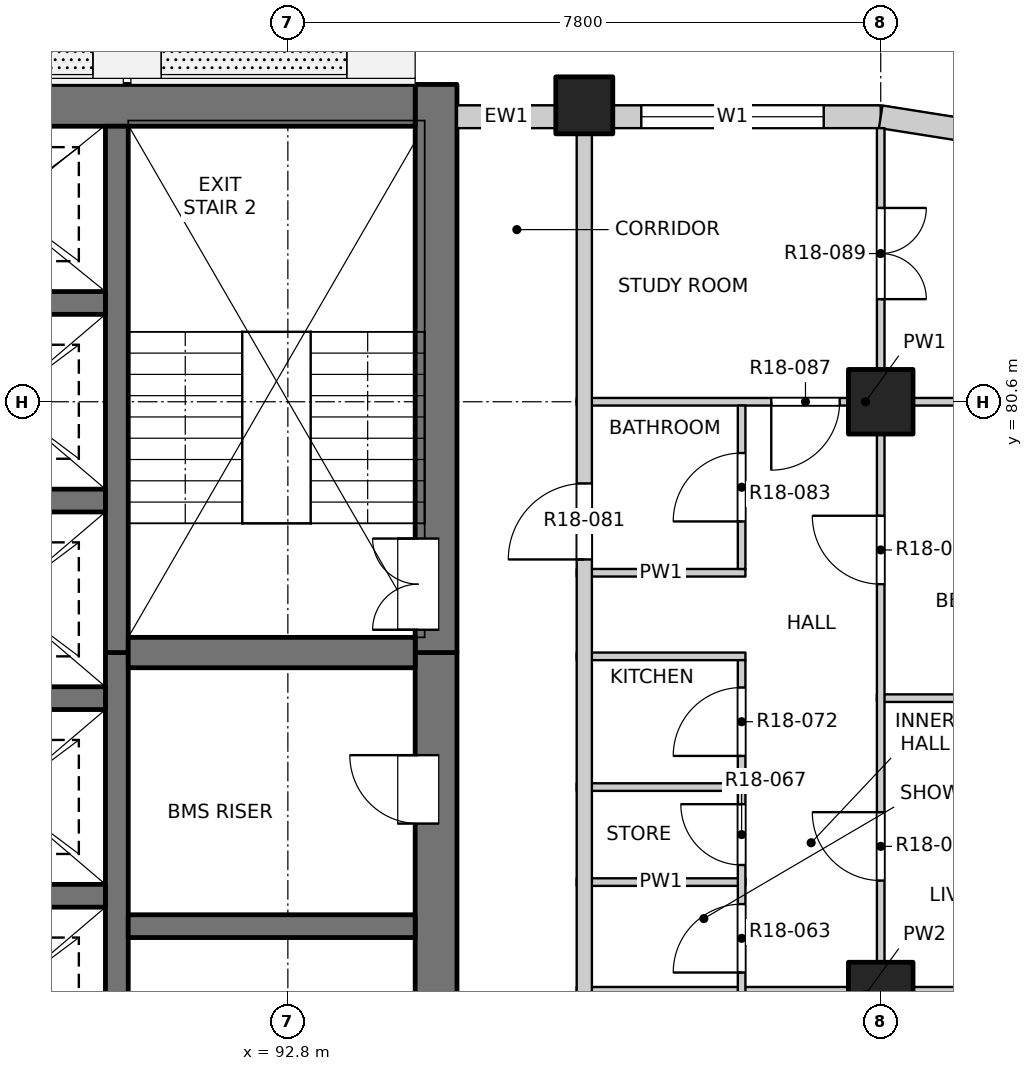
"""IFC4 building model, lengths in metres.
Left out: names, types, materials, properties, quantities, classifications, styles, units other than length and angle.
Written with IfcOpenShell. Run it as: python <this file> out.ifc"""

import sys

from ifc_helpers import new_model, si_unit, direction, frame, frame_2d, origin, origin_2d, place, context, subcontext, project, spatial, rectangle, extrude, element, fill, save


model = new_model("IFC4")
c1 = context("Model", 3, precision=1e-05, world=origin(), true_north=direction((0.0, 1.0)))
c2 = subcontext(c1, "Body", "Model", "MODEL_VIEW")
j1 = project(units=[si_unit("LENGTHUNIT", "METRE"), si_unit("PLANEANGLEUNIT", "RADIAN")], contexts=[c1])
p1 = place(None, origin())
s1 = spatial("IfcSite", under=j1, at=p1, CompositionType="ELEMENT")
p2 = place(p1, origin())
s2 = spatial("IfcBuilding", under=s1, at=p2, CompositionType="ELEMENT")
p3 = place(p2, frame((0.0, 0.0, 189.4)))
s3 = spatial("IfcBuildingStorey", under=s2, at=p3, CompositionType="ELEMENT", Elevation=189.4)
p4 = place(p3, frame((96.7, 84.5, -0.25), z_axis=(0.0, 0.0, 1.0), x_axis=(1.0, 0.0, 0.0)))
e1 = element("IfcColumn", 1, at=p4, inside=s3, PredefinedType="COLUMN", context=c2, shape_type="SweptSolid", body=[
    extrude(rectangle(XDim=0.75, YDim=0.75, at=origin_2d()), origin(), (0.0, 0.0, 1.0), 3.35),
])
for number, where, z_axis, x_axis in (
    (2, (100.6, 72.8, -0.25), (0.0, 0.0, 1.0), (1.0, 0.0, 0.0)),
    (3, (100.6, 80.6, -0.25), (0.0, 0.0, 1.0), (1.0, 0.0, 0.0)),
):
    element("IfcColumn", number, at=place(p3, frame(where, z_axis=z_axis, x_axis=x_axis)), inside=s3, PredefinedType="COLUMN", context=c2, shape_type="SweptSolid", body=[
        extrude(rectangle(XDim=0.85, YDim=0.85, at=origin_2d()), origin(), (0.0, 0.0, 1.0), 3.35),
    ])
p5 = place(p3, frame((94.75, 61.95, -0.25), z_axis=(0.0, 0.0, 1.0), x_axis=(0.0, 1.0, 0.0)))
e4 = element("IfcWall", 4, at=p5, inside=s3, PredefinedType="SOLIDWALL", context=c2, shape_type="SweptSolid", body=[
    extrude(rectangle(XDim=15.35, YDim=0.55, at=frame_2d((7.675, 0.0))), origin(), (0.0, 0.0, 1.0), 3.35),
])
p6 = place(p5, frame((0.925, 0.0, 0.25)))
e5 = element("IfcOpeningElement", 5, at=p6, cuts=e4, PredefinedType="OPENING", context=c2, shape_type="SweptSolid", body=[
    extrude(rectangle(XDim=0.9, YDim=2.1, at=frame_2d((0.45, 1.05))), frame((0.0, 0.285, 0.0), z_axis=(0.0, -1.0, 0.0), x_axis=(1.0, 0.0, 0.0)), (0.0, 0.0, 1.0), 0.57),
])
p7 = place(p5, frame((6.8, 0.0, 0.25)))
e6 = element("IfcOpeningElement", 6, at=p7, cuts=e4, PredefinedType="OPENING", context=c2, shape_type="SweptSolid", body=[
    extrude(rectangle(XDim=0.9, YDim=2.1, at=frame_2d((0.45, 1.05))), frame((0.0, 0.285, 0.0), z_axis=(0.0, -1.0, 0.0), x_axis=(1.0, 0.0, 0.0)), (0.0, 0.0, 1.0), 0.57),
])
p8 = place(p5, frame((13.1, 0.0, 0.25)))
e7 = element("IfcOpeningElement", 7, at=p8, cuts=e4, PredefinedType="OPENING", context=c2, shape_type="SweptSolid", body=[
    extrude(rectangle(XDim=0.9, YDim=2.1, at=frame_2d((0.45, 1.05))), frame((0.0, 0.285, 0.0), z_axis=(0.0, -1.0, 0.0), x_axis=(1.0, 0.0, 0.0)), (0.0, 0.0, 1.0), 0.57),
])
p9 = place(p3, frame((94.75, 77.3, -0.25), z_axis=(0.0, 0.0, 1.0), x_axis=(0.0, 1.0, 0.0)))
e8 = element("IfcWall", 8, at=p9, inside=s3, PredefinedType="SOLIDWALL", context=c2, shape_type="SweptSolid", body=[
    extrude(rectangle(XDim=7.475, YDim=0.55, at=frame_2d((3.737, 0.0))), origin(), (0.0, 0.0, 1.0), 3.35),
])
p10 = place(p9, frame((0.3, 0.0, 0.25)))
e9 = element("IfcOpeningElement", 9, at=p10, cuts=e8, PredefinedType="OPENING", context=c2, shape_type="SweptSolid", body=[
    extrude(rectangle(XDim=1.2, YDim=2.1, at=frame_2d((0.6, 1.05))), frame((0.0, 0.285, 0.0), z_axis=(0.0, -1.0, 0.0), x_axis=(1.0, 0.0, 0.0)), (0.0, 0.0, 1.0), 0.57),
])
p11 = place(p3, frame((75.525, 84.5, -0.25), z_axis=(0.0, 0.0, 1.0), x_axis=(1.0, 0.0, 0.0)))
e10 = element("IfcWall", 10, at=p11, inside=s3, PredefinedType="SOLIDWALL", context=c2, shape_type="SweptSolid", body=[
    extrude(rectangle(XDim=18.95, YDim=0.55, at=frame_2d((9.475, 0.0))), origin(), (0.0, 0.0, 1.0), 3.35),
])
p12 = place(p3, frame((90.55, 61.95, -0.25), z_axis=(0.0, 0.0, 1.0), x_axis=(0.0, 1.0, 0.0)))
e11 = element("IfcWall", 11, at=p12, inside=s3, PredefinedType="SOLIDWALL", context=c2, shape_type="SweptSolid", body=[
    extrude(rectangle(XDim=15.35, YDim=0.3, at=frame_2d((7.675, 0.0))), origin(), (0.0, 0.0, 1.0), 3.35),
])
p13 = place(p3, frame((90.55, 77.3, -0.25), z_axis=(0.0, 0.0, 1.0), x_axis=(0.0, 1.0, 0.0)))
e12 = element("IfcWall", 12, at=p13, inside=s3, PredefinedType="SOLIDWALL", context=c2, shape_type="SweptSolid", body=[
    extrude(rectangle(XDim=6.925, YDim=0.3, at=frame_2d((3.462, 0.0))), origin(), (0.0, 0.0, 1.0), 3.35),
])
for number, where, z_axis, x_axis in (
    (13, (87.4, 74.1, -0.25), (0.0, 0.0, 1.0), (1.0, 0.0, 0.0)),
    (14, (87.4, 76.7, -0.25), (0.0, 0.0, 1.0), (1.0, 0.0, 0.0)),
    (15, (87.4, 79.3, -0.25), (0.0, 0.0, 1.0), (1.0, 0.0, 0.0)),
    (16, (87.4, 81.9, -0.25), (0.0, 0.0, 1.0), (1.0, 0.0, 0.0)),
):
    element("IfcWall", number, at=place(p3, frame(where, z_axis=z_axis, x_axis=x_axis)), inside=s3, PredefinedType="SOLIDWALL", context=c2, shape_type="SweptSolid", body=[
        extrude(rectangle(XDim=3.0, YDim=0.3, at=frame_2d((1.5, 0.0))), origin(), (0.0, 0.0, 1.0), 3.35),
    ])
p14 = place(p3, frame((90.7, 73.7, -0.25), z_axis=(0.0, 0.0, 1.0), x_axis=(1.0, 0.0, 0.0)))
e17 = element("IfcWall", 17, at=p14, inside=s3, PredefinedType="SOLIDWALL", context=c2, shape_type="SweptSolid", body=[
    extrude(rectangle(XDim=3.775, YDim=0.3, at=frame_2d((1.888, 0.0))), origin(), (0.0, 0.0, 1.0), 3.35),
])
p15 = place(p3, frame((90.7, 77.3, -0.25), z_axis=(0.0, 0.0, 1.0), x_axis=(1.0, 0.0, 0.0)))
e18 = element("IfcWall", 18, at=p15, inside=s3, PredefinedType="SOLIDWALL", context=c2, shape_type="SweptSolid", body=[
    extrude(rectangle(XDim=3.775, YDim=0.4, at=frame_2d((1.888, 0.0))), origin(), (0.0, 0.0, 1.0), 3.35),
])
p16 = place(p3, frame((95.025, 84.35, 0.0), z_axis=(0.0, 0.0, 1.0), x_axis=(1.0, 0.0, 0.0)))
e19 = element("IfcWall", 19, at=p16, inside=s3, PredefinedType="SOLIDWALL", context=c2, shape_type="SweptSolid", body=[
    extrude(rectangle(XDim=1.3, YDim=0.3, at=frame_2d((0.65, 0.0))), origin(), (0.0, 0.0, 1.0), 3.1),
])
p17 = place(p3, frame((97.075, 84.35, 0.0), z_axis=(0.0, 0.0, 1.0), x_axis=(1.0, 0.0, 0.0)))
e20 = element("IfcWall", 20, at=p17, inside=s3, PredefinedType="SOLIDWALL", context=c2, shape_type="SweptSolid", body=[
    extrude(rectangle(XDim=3.525, YDim=0.3, at=frame_2d((1.763, 0.0))), origin(), (0.0, 0.0, 1.0), 3.1),
])
p18 = place(p17, frame((0.375, 0.0, 0.9)))
e21 = element("IfcOpeningElement", 21, at=p18, cuts=e20, PredefinedType="OPENING", context=c2, shape_type="SweptSolid", body=[
    extrude(rectangle(XDim=2.4, YDim=1.8, at=frame_2d((1.2, 0.9))), frame((0.0, 0.16, 0.0), z_axis=(0.0, -1.0, 0.0), x_axis=(1.0, 0.0, 0.0)), (0.0, 0.0, 1.0), 0.32),
])
p19 = place(p3, frame((101.759, 84.167, 0.0), z_axis=(0.0, 0.0, 1.0), x_axis=(-0.987678452879, 0.156496880861, 0.0)))
e22 = element("IfcWall", 22, at=p19, inside=s3, PredefinedType="SOLIDWALL", context=c2, shape_type="SweptSolid", body=[
    extrude(rectangle(XDim=1.173, YDim=0.3, at=frame_2d((0.586, 0.0))), origin(), (0.0, 0.0, 1.0), 3.1),
])
p20 = place(p3, frame((96.6, 72.8, 0.0), z_axis=(0.0, 0.0, 1.0), x_axis=(1.0, 0.0, 0.0)))
e23 = element("IfcWall", 23, at=p20, inside=s3, PredefinedType="PARTITIONING", context=c2, shape_type="SweptSolid", body=[
    extrude(rectangle(XDim=7.6, YDim=0.2, at=frame_2d((3.8, 0.0))), origin(), (0.0, 0.0, 1.0), 3.1),
])
for number, where, z_axis, x_axis in (
    (24, (96.6, 74.28, 0.0), (0.0, 0.0, 1.0), (1.0, 0.0, 0.0)),
    (25, (96.6, 75.53, 0.0), (0.0, 0.0, 1.0), (1.0, 0.0, 0.0)),
):
    element("IfcWall", number, at=place(p3, frame(where, z_axis=z_axis, x_axis=x_axis)), inside=s3, PredefinedType="PARTITIONING", context=c2, shape_type="SweptSolid", body=[
        extrude(rectangle(XDim=2.22, YDim=0.1, at=frame_2d((1.11, 0.0))), origin(), (0.0, 0.0, 1.0), 3.1),
    ])
p21 = place(p3, frame((100.55, 76.7, 0.0), z_axis=(0.0, 0.0, 1.0), x_axis=(1.0, 0.0, 0.0)))
e26 = element("IfcWall", 26, at=p21, inside=s3, PredefinedType="PARTITIONING", context=c2, shape_type="SweptSolid", body=[
    extrude(rectangle(XDim=3.65, YDim=0.1, at=frame_2d((1.825, 0.0))), origin(), (0.0, 0.0, 1.0), 3.1),
])
for number, where, z_axis, x_axis in (
    (27, (96.6, 77.25, 0.0), (0.0, 0.0, 1.0), (1.0, 0.0, 0.0)),
    (28, (96.6, 78.35, 0.0), (0.0, 0.0, 1.0), (1.0, 0.0, 0.0)),
):
    element("IfcWall", number, at=place(p3, frame(where, z_axis=z_axis, x_axis=x_axis)), inside=s3, PredefinedType="PARTITIONING", context=c2, shape_type="SweptSolid", body=[
        extrude(rectangle(XDim=2.22, YDim=0.1, at=frame_2d((1.11, 0.0))), origin(), (0.0, 0.0, 1.0), 3.1),
    ])
p22 = place(p3, frame((96.6, 80.6, 0.0), z_axis=(0.0, 0.0, 1.0), x_axis=(1.0, 0.0, 0.0)))
e29 = element("IfcWall", 29, at=p22, inside=s3, PredefinedType="PARTITIONING", context=c2, shape_type="SweptSolid", body=[
    extrude(rectangle(XDim=7.6, YDim=0.1, at=frame_2d((3.8, 0.0))), origin(), (0.0, 0.0, 1.0), 3.1),
])
p23 = place(p22, frame((2.56, 0.0, 0.0)))
e30 = element("IfcOpeningElement", 30, at=p23, cuts=e29, PredefinedType="OPENING", context=c2, shape_type="SweptSolid", body=[
    extrude(rectangle(XDim=0.9, YDim=2.1, at=frame_2d((0.45, 1.05))), frame((0.0, 0.06, 0.0), z_axis=(0.0, -1.0, 0.0), x_axis=(1.0, 0.0, 0.0)), (0.0, 0.0, 1.0), 0.12),
])
p24 = place(p3, frame((96.7, 49.5, 0.0), z_axis=(0.0, 0.0, 1.0), x_axis=(0.0, 1.0, 0.0)))
e31 = element("IfcWall", 31, at=p24, inside=s3, PredefinedType="PARTITIONING", context=c2, shape_type="SweptSolid", body=[
    extrude(rectangle(XDim=34.7, YDim=0.2, at=frame_2d((17.35, 0.0))), origin(), (0.0, 0.0, 1.0), 3.1),
])
p25 = place(p24, frame((7.425, 0.0, 0.0)))
e32 = element("IfcOpeningElement", 32, at=p25, cuts=e31, PredefinedType="OPENING", context=c2, shape_type="SweptSolid", body=[
    extrude(rectangle(XDim=1.0, YDim=2.1, at=frame_2d((0.5, 1.05))), frame((0.0, 0.11, 0.0), z_axis=(0.0, -1.0, 0.0), x_axis=(1.0, 0.0, 0.0)), (0.0, 0.0, 1.0), 0.22),
])
p26 = place(p24, frame((18.475, 0.0, 0.0)))
e33 = element("IfcOpeningElement", 33, at=p26, cuts=e31, PredefinedType="OPENING", context=c2, shape_type="SweptSolid", body=[
    extrude(rectangle(XDim=1.0, YDim=2.1, at=frame_2d((0.5, 1.05))), frame((0.0, 0.11, 0.0), z_axis=(0.0, -1.0, 0.0), x_axis=(1.0, 0.0, 0.0)), (0.0, 0.0, 1.0), 0.22),
])
p27 = place(p24, frame((29.025, 0.0, 0.0)))
e34 = element("IfcOpeningElement", 34, at=p27, cuts=e31, PredefinedType="OPENING", context=c2, shape_type="SweptSolid", body=[
    extrude(rectangle(XDim=1.0, YDim=2.1, at=frame_2d((0.5, 1.05))), frame((0.0, 0.11, 0.0), z_axis=(0.0, -1.0, 0.0), x_axis=(1.0, 0.0, 0.0)), (0.0, 0.0, 1.0), 0.22),
])
p28 = place(p3, frame((98.77, 67.85, 0.0), z_axis=(0.0, 0.0, 1.0), x_axis=(0.0, 1.0, 0.0)))
e35 = element("IfcWall", 35, at=p28, inside=s3, PredefinedType="PARTITIONING", context=c2, shape_type="SweptSolid", body=[
    extrude(rectangle(XDim=9.35, YDim=0.1, at=frame_2d((4.675, 0.0))), origin(), (0.0, 0.0, 1.0), 3.1),
])
p29 = place(p28, frame((0.55, 0.0, 0.0)))
e36 = element("IfcOpeningElement", 36, at=p29, cuts=e35, PredefinedType="OPENING", context=c2, shape_type="SweptSolid", body=[
    extrude(rectangle(XDim=0.9, YDim=2.1, at=frame_2d((0.45, 1.05))), frame((0.0, 0.06, 0.0), z_axis=(0.0, -1.0, 0.0), x_axis=(1.0, 0.0, 0.0)), (0.0, 0.0, 1.0), 0.12),
])
p30 = place(p28, frame((3.05, 0.0, 0.0)))
e37 = element("IfcOpeningElement", 37, at=p30, cuts=e35, PredefinedType="OPENING", context=c2, shape_type="SweptSolid", body=[
    extrude(rectangle(XDim=0.9, YDim=2.1, at=frame_2d((0.45, 1.05))), frame((0.0, 0.06, 0.0), z_axis=(0.0, -1.0, 0.0), x_axis=(1.0, 0.0, 0.0)), (0.0, 0.0, 1.0), 0.12),
])
p31 = place(p28, frame((5.24, 0.0, 0.0)))
e38 = element("IfcOpeningElement", 38, at=p31, cuts=e35, PredefinedType="OPENING", context=c2, shape_type="SweptSolid", body=[
    extrude(rectangle(XDim=0.9, YDim=2.1, at=frame_2d((0.45, 1.05))), frame((0.0, 0.06, 0.0), z_axis=(0.0, -1.0, 0.0), x_axis=(1.0, 0.0, 0.0)), (0.0, 0.0, 1.0), 0.12),
])
p32 = place(p28, frame((6.655, 0.0, 0.0)))
e39 = element("IfcOpeningElement", 39, at=p32, cuts=e35, PredefinedType="OPENING", context=c2, shape_type="SweptSolid", body=[
    extrude(rectangle(XDim=0.8, YDim=2.1, at=frame_2d((0.4, 1.05))), frame((0.0, 0.06, 0.0), z_axis=(0.0, -1.0, 0.0), x_axis=(1.0, 0.0, 0.0)), (0.0, 0.0, 1.0), 0.12),
])
p33 = place(p28, frame((8.09, 0.0, 0.0)))
e40 = element("IfcOpeningElement", 40, at=p33, cuts=e35, PredefinedType="OPENING", context=c2, shape_type="SweptSolid", body=[
    extrude(rectangle(XDim=0.9, YDim=2.1, at=frame_2d((0.45, 1.05))), frame((0.0, 0.06, 0.0), z_axis=(0.0, -1.0, 0.0), x_axis=(1.0, 0.0, 0.0)), (0.0, 0.0, 1.0), 0.12),
])
p34 = place(p3, frame((98.77, 78.4, 0.0), z_axis=(0.0, 0.0, 1.0), x_axis=(0.0, 1.0, 0.0)))
e41 = element("IfcWall", 41, at=p34, inside=s3, PredefinedType="PARTITIONING", context=c2, shape_type="SweptSolid", body=[
    extrude(rectangle(XDim=2.15, YDim=0.1, at=frame_2d((1.075, 0.0))), origin(), (0.0, 0.0, 1.0), 3.1),
])
p35 = place(p34, frame((0.625, 0.0, 0.0)))
e42 = element("IfcOpeningElement", 42, at=p35, cuts=e41, PredefinedType="OPENING", context=c2, shape_type="SweptSolid", body=[
    extrude(rectangle(XDim=0.9, YDim=2.1, at=frame_2d((0.45, 1.05))), frame((0.0, 0.06, 0.0), z_axis=(0.0, -1.0, 0.0), x_axis=(1.0, 0.0, 0.0)), (0.0, 0.0, 1.0), 0.12),
])
p36 = place(p3, frame((100.6, 45.8, 0.0), z_axis=(0.0, 0.0, 1.0), x_axis=(0.0, 1.0, 0.0)))
e43 = element("IfcWall", 43, at=p36, inside=s3, PredefinedType="PARTITIONING", context=c2, shape_type="SweptSolid", body=[
    extrude(rectangle(XDim=38.4, YDim=0.1, at=frame_2d((19.2, 0.0))), origin(), (0.0, 0.0, 1.0), 3.1),
])
p37 = place(p36, frame((1.05, 0.0, 0.0)))
e44 = element("IfcOpeningElement", 44, at=p37, cuts=e43, PredefinedType="OPENING", context=c2, shape_type="SweptSolid", body=[
    extrude(rectangle(XDim=1.2, YDim=2.1, at=frame_2d((0.6, 1.05))), frame((0.0, 0.06, 0.0), z_axis=(0.0, -1.0, 0.0), x_axis=(1.0, 0.0, 0.0)), (0.0, 0.0, 1.0), 0.12),
])
p38 = place(p36, frame((5.1, 0.0, 0.0)))
e45 = element("IfcOpeningElement", 45, at=p38, cuts=e43, PredefinedType="OPENING", context=c2, shape_type="SweptSolid", body=[
    extrude(rectangle(XDim=0.9, YDim=2.1, at=frame_2d((0.45, 1.05))), frame((0.0, 0.06, 0.0), z_axis=(0.0, -1.0, 0.0), x_axis=(1.0, 0.0, 0.0)), (0.0, 0.0, 1.0), 0.12),
])
p39 = place(p36, frame((9.0, 0.0, 0.0)))
e46 = element("IfcOpeningElement", 46, at=p39, cuts=e43, PredefinedType="OPENING", context=c2, shape_type="SweptSolid", body=[
    extrude(rectangle(XDim=0.9, YDim=2.1, at=frame_2d((0.45, 1.05))), frame((0.0, 0.06, 0.0), z_axis=(0.0, -1.0, 0.0), x_axis=(1.0, 0.0, 0.0)), (0.0, 0.0, 1.0), 0.12),
])
p40 = place(p36, frame((12.9, 0.0, 0.0)))
e47 = element("IfcOpeningElement", 47, at=p40, cuts=e43, PredefinedType="OPENING", context=c2, shape_type="SweptSolid", body=[
    extrude(rectangle(XDim=0.9, YDim=2.1, at=frame_2d((0.45, 1.05))), frame((0.0, 0.06, 0.0), z_axis=(0.0, -1.0, 0.0), x_axis=(1.0, 0.0, 0.0)), (0.0, 0.0, 1.0), 0.12),
])
p41 = place(p36, frame((19.725, 0.0, 0.0)))
e48 = element("IfcOpeningElement", 48, at=p41, cuts=e43, PredefinedType="OPENING", context=c2, shape_type="SweptSolid", body=[
    extrude(rectangle(XDim=1.2, YDim=2.1, at=frame_2d((0.6, 1.05))), frame((0.0, 0.06, 0.0), z_axis=(0.0, -1.0, 0.0), x_axis=(1.0, 0.0, 0.0)), (0.0, 0.0, 1.0), 0.12),
])
p42 = place(p36, frame((24.6, 0.0, 0.0)))
e49 = element("IfcOpeningElement", 49, at=p42, cuts=e43, PredefinedType="OPENING", context=c2, shape_type="SweptSolid", body=[
    extrude(rectangle(XDim=0.9, YDim=2.1, at=frame_2d((0.45, 1.05))), frame((0.0, 0.06, 0.0), z_axis=(0.0, -1.0, 0.0), x_axis=(1.0, 0.0, 0.0)), (0.0, 0.0, 1.0), 0.12),
])
p43 = place(p36, frame((28.5, 0.0, 0.0)))
e50 = element("IfcOpeningElement", 50, at=p43, cuts=e43, PredefinedType="OPENING", context=c2, shape_type="SweptSolid", body=[
    extrude(rectangle(XDim=0.9, YDim=2.1, at=frame_2d((0.45, 1.05))), frame((0.0, 0.06, 0.0), z_axis=(0.0, -1.0, 0.0), x_axis=(1.0, 0.0, 0.0)), (0.0, 0.0, 1.0), 0.12),
])
p44 = place(p36, frame((32.4, 0.0, 0.0)))
e51 = element("IfcOpeningElement", 51, at=p44, cuts=e43, PredefinedType="OPENING", context=c2, shape_type="SweptSolid", body=[
    extrude(rectangle(XDim=0.9, YDim=2.1, at=frame_2d((0.45, 1.05))), frame((0.0, 0.06, 0.0), z_axis=(0.0, -1.0, 0.0), x_axis=(1.0, 0.0, 0.0)), (0.0, 0.0, 1.0), 0.12),
])
p45 = place(p36, frame((36.15, 0.0, 0.0)))
e52 = element("IfcOpeningElement", 52, at=p45, cuts=e43, PredefinedType="OPENING", context=c2, shape_type="SweptSolid", body=[
    extrude(rectangle(XDim=1.2, YDim=2.1, at=frame_2d((0.6, 1.05))), frame((0.0, 0.06, 0.0), z_axis=(0.0, -1.0, 0.0), x_axis=(1.0, 0.0, 0.0)), (0.0, 0.0, 1.0), 0.12),
])
p46 = place(p18, origin())
e53 = element("IfcWindow", 53, at=p46, inside=s3, PartitioningType="DOUBLE_PANEL_VERTICAL", PredefinedType="WINDOW", context=c2, shape_type="SweptSolid", body=[
    extrude(rectangle(XDim=2.4, YDim=1.8, at=frame_2d((1.2, 0.9))), frame((0.0, 0.03, 0.0), z_axis=(0.0, -1.0, 0.0), x_axis=(1.0, 0.0, 0.0)), (0.0, 0.0, 1.0), 0.06),
])
fill(e21, e53)
p47 = place(p31, origin())
e54 = element("IfcDoor", 54, at=p47, inside=s3, OperationType="SINGLE_SWING_LEFT", PredefinedType="DOOR", context=c2, shape_type="SweptSolid", body=[
    extrude(rectangle(XDim=0.9, YDim=2.1, at=frame_2d((0.45, 1.05))), frame((0.0, 0.025, 0.0), z_axis=(0.0, -1.0, 0.0), x_axis=(1.0, 0.0, 0.0)), (0.0, 0.0, 1.0), 0.05),
])
fill(e38, e54)
p48 = place(p43, origin())
e55 = element("IfcDoor", 55, at=p48, inside=s3, OperationType="SINGLE_SWING_RIGHT", PredefinedType="DOOR", context=c2, shape_type="SweptSolid", body=[
    extrude(rectangle(XDim=0.9, YDim=2.1, at=frame_2d((0.45, 1.05))), frame((0.0, 0.025, 0.0), z_axis=(0.0, -1.0, 0.0), x_axis=(1.0, 0.0, 0.0)), (0.0, 0.0, 1.0), 0.05),
])
fill(e50, e55)
p49 = place(p32, origin())
e56 = element("IfcDoor", 56, at=p49, inside=s3, OperationType="SINGLE_SWING_RIGHT", PredefinedType="DOOR", context=c2, shape_type="SweptSolid", body=[
    extrude(rectangle(XDim=0.8, YDim=2.1, at=frame_2d((0.4, 1.05))), frame((0.0, 0.025, 0.0), z_axis=(0.0, -1.0, 0.0), x_axis=(1.0, 0.0, 0.0)), (0.0, 0.0, 1.0), 0.05),
])
fill(e39, e56)
p50 = place(p8, origin())
e57 = element("IfcDoor", 57, at=p50, inside=s3, OperationType="SINGLE_SWING_RIGHT", PredefinedType="DOOR", context=c2, shape_type="SweptSolid", body=[
    extrude(rectangle(XDim=0.9, YDim=2.1, at=frame_2d((0.45, 1.05))), frame((0.0, 0.26, 0.0), z_axis=(0.0, -1.0, 0.0), x_axis=(1.0, 0.0, 0.0)), (0.0, 0.0, 1.0), 0.05),
])
fill(e7, e57)
p51 = place(p33, origin())
e58 = element("IfcDoor", 58, at=p51, inside=s3, OperationType="SINGLE_SWING_LEFT", PredefinedType="DOOR", context=c2, shape_type="SweptSolid", body=[
    extrude(rectangle(XDim=0.9, YDim=2.1, at=frame_2d((0.45, 1.05))), frame((0.0, 0.025, 0.0), z_axis=(0.0, -1.0, 0.0), x_axis=(1.0, 0.0, 0.0)), (0.0, 0.0, 1.0), 0.05),
])
fill(e40, e58)
p52 = place(p10, origin())
e59 = element("IfcDoor", 59, at=p52, inside=s3, OperationType="DOUBLE_DOOR_SINGLE_SWING", PredefinedType="DOOR", context=c2, shape_type="SweptSolid", body=[
    extrude(rectangle(XDim=1.2, YDim=2.1, at=frame_2d((0.6, 1.05))), frame((0.0, 0.26, 0.0), z_axis=(0.0, -1.0, 0.0), x_axis=(1.0, 0.0, 0.0)), (0.0, 0.0, 1.0), 0.05),
])
fill(e9, e59)
p53 = place(p44, origin())
e60 = element("IfcDoor", 60, at=p53, inside=s3, OperationType="SINGLE_SWING_RIGHT", PredefinedType="DOOR", context=c2, shape_type="SweptSolid", body=[
    extrude(rectangle(XDim=0.9, YDim=2.1, at=frame_2d((0.45, 1.05))), frame((0.0, 0.025, 0.0), z_axis=(0.0, -1.0, 0.0), x_axis=(1.0, 0.0, 0.0)), (0.0, 0.0, 1.0), 0.05),
])
fill(e51, e60)
p54 = place(p27, origin())
e61 = element("IfcDoor", 61, at=p54, inside=s3, OperationType="SINGLE_SWING_LEFT", PredefinedType="DOOR", context=c2, shape_type="SweptSolid", body=[
    extrude(rectangle(XDim=1.0, YDim=2.1, at=frame_2d((0.5, 1.05))), frame((0.0, 0.025, 0.0), z_axis=(0.0, -1.0, 0.0), x_axis=(1.0, 0.0, 0.0)), (0.0, 0.0, 1.0), 0.05),
])
fill(e34, e61)
p55 = place(p35, origin())
e62 = element("IfcDoor", 62, at=p55, inside=s3, OperationType="SINGLE_SWING_LEFT", PredefinedType="DOOR", context=c2, shape_type="SweptSolid", body=[
    extrude(rectangle(XDim=0.9, YDim=2.1, at=frame_2d((0.45, 1.05))), frame((0.0, 0.025, 0.0), z_axis=(0.0, -1.0, 0.0), x_axis=(1.0, 0.0, 0.0)), (0.0, 0.0, 1.0), 0.05),
])
fill(e42, e62)
p56 = place(p23, origin())
e63 = element("IfcDoor", 63, at=p56, inside=s3, OperationType="SINGLE_SWING_RIGHT", PredefinedType="DOOR", context=c2, shape_type="SweptSolid", body=[
    extrude(rectangle(XDim=0.9, YDim=2.1, at=frame_2d((0.45, 1.05))), frame((0.0, 0.025, 0.0), z_axis=(0.0, -1.0, 0.0), x_axis=(1.0, 0.0, 0.0)), (0.0, 0.0, 1.0), 0.05),
])
fill(e30, e63)
p57 = place(p45, origin())
e64 = element("IfcDoor", 64, at=p57, inside=s3, OperationType="DOUBLE_DOOR_SINGLE_SWING", PredefinedType="DOOR", context=c2, shape_type="SweptSolid", body=[
    extrude(rectangle(XDim=1.2, YDim=2.1, at=frame_2d((0.6, 1.05))), frame((0.0, 0.025, 0.0), z_axis=(0.0, -1.0, 0.0), x_axis=(1.0, 0.0, 0.0)), (0.0, 0.0, 1.0), 0.05),
])
fill(e52, e64)
save(model, sys.argv[1])
